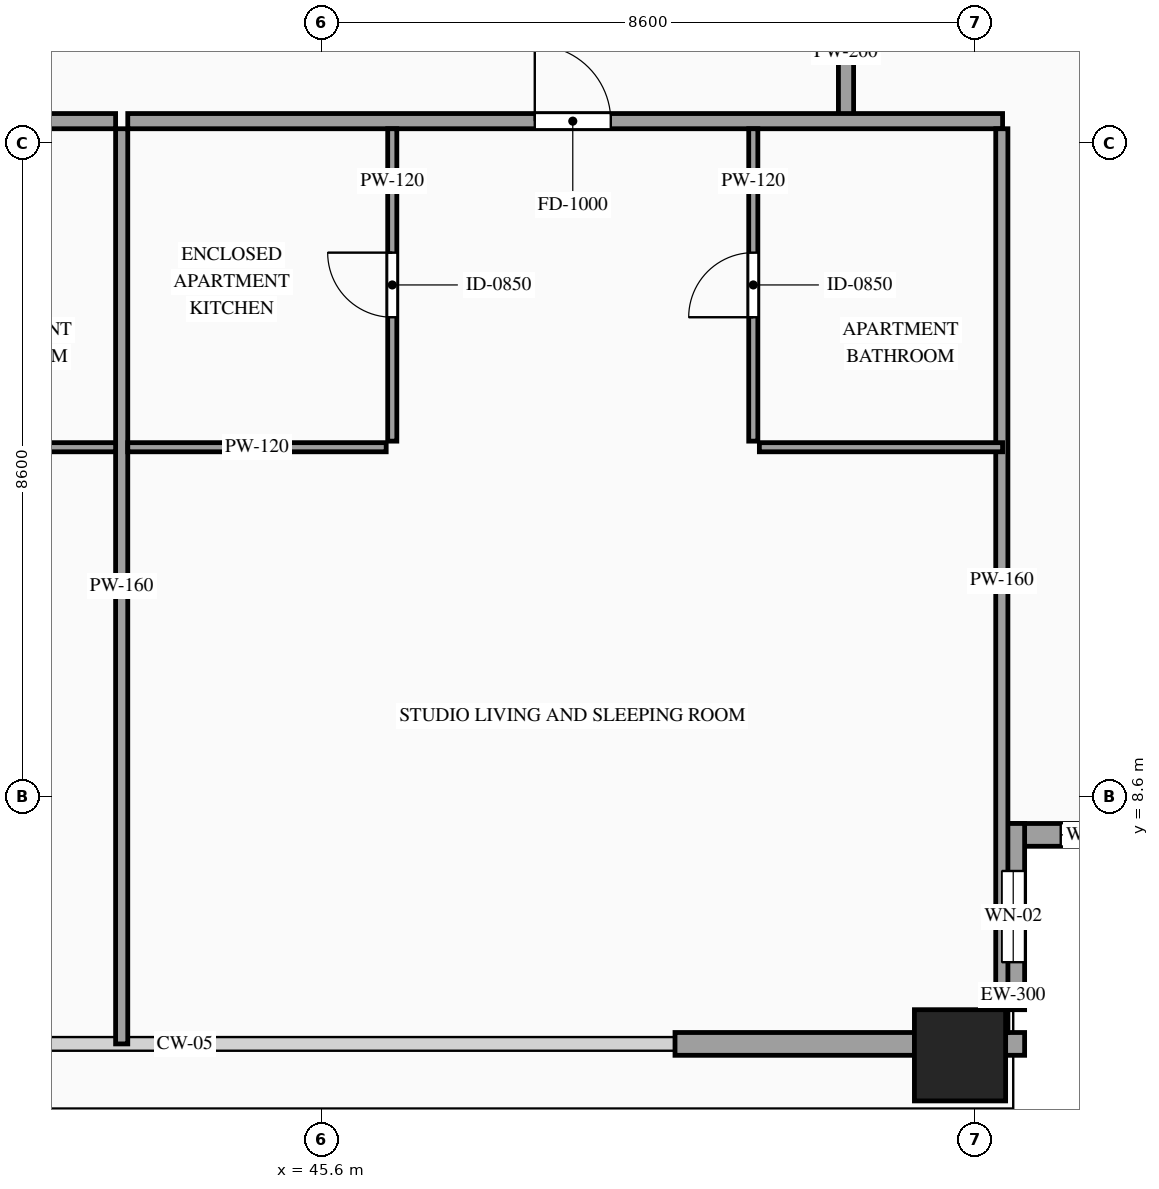
"""IFC4 building model, lengths in metres.
Left out: names, types, materials, properties, quantities, classifications, styles, units other than length and angle.
Written with IfcOpenShell. Run it as: python <this file> out.ifc"""

import sys

from ifc_helpers import new_model, si_unit, direction, frame, frame_2d, origin, origin_2d, place, context, subcontext, project, spatial, rectangle, hollow_rectangle, extrude, source, transform, mapped, element, fill, save


model = new_model("IFC4")
c1 = context("Model", 3, precision=1e-05, world=origin(), true_north=direction((0.0, 1.0)))
c2 = subcontext(c1, "Body", "Model", "MODEL_VIEW")
j1 = project(units=[si_unit("LENGTHUNIT", "METRE"), si_unit("PLANEANGLEUNIT", "RADIAN")], contexts=[c1])
p1 = place(None, origin())
s1 = spatial("IfcSite", under=j1, at=p1, CompositionType="ELEMENT")
p2 = place(p1, origin())
s2 = spatial("IfcBuilding", under=s1, at=p2, CompositionType="ELEMENT")
p3 = place(p2, frame((0.0, 0.0, 268.1)))
s3 = spatial("IfcBuildingStorey", under=s2, at=p3, CompositionType="ELEMENT", Elevation=268.1)
m1 = source(origin(), c2, "Body", "SweptSolid", [
    extrude(hollow_rectangle(XDim=1.2, YDim=1.2, WallThickness=0.055, at=origin_2d()), origin(), (0.0, 0.0, 1.0), 3.5),
])
p4 = place(p3, frame((54.0, 5.2, 0.0), z_axis=(0.0, 0.0, 1.0), x_axis=(1.0, 0.0, 0.0)))
e1 = element("IfcColumn", 1, at=p4, inside=s3, PredefinedType="COLUMN", context=c2, shape_type="MappedRepresentation", body=[
    mapped(m1, transform((0.0, 0.0, 0.0), scale=1.0)),
])
p5 = place(p3, frame((54.55, 8.1, 0.0), z_axis=(0.0, 0.0, 1.0), x_axis=(1.0, 0.0, 0.0)))
e2 = element("IfcWall", 2, at=p5, inside=s3, PredefinedType="SOLIDWALL", context=c2, shape_type="SweptSolid", body=[
    extrude(rectangle(XDim=2.45, YDim=0.3, at=frame_2d((1.225, 0.0))), origin(), (0.0, 0.0, 1.0), 3.28),
])
p6 = place(p5, frame((0.775, 0.0, 0.85)))
e3 = element("IfcOpeningElement", 3, at=p6, cuts=e2, PredefinedType="OPENING", context=c2, shape_type="SweptSolid", body=[
    extrude(rectangle(XDim=0.9, YDim=1.5, at=frame_2d((0.45, 0.75))), frame((0.0, 0.165, 0.0), z_axis=(0.0, -1.0, 0.0), x_axis=(1.0, 0.0, 0.0)), (0.0, 0.0, 1.0), 0.33),
])
p7 = place(p3, frame((54.7, 5.8, 0.0), z_axis=(0.0, 0.0, 1.0), x_axis=(0.0, 1.0, 0.0)))
e4 = element("IfcWall", 4, at=p7, inside=s3, PredefinedType="SOLIDWALL", context=c2, shape_type="SweptSolid", body=[
    extrude(rectangle(XDim=2.45, YDim=0.3, at=frame_2d((1.225, 0.0))), origin(), (0.0, 0.0, 1.0), 3.28),
])
p8 = place(p7, frame((0.625, 0.0, 0.85)))
e5 = element("IfcOpeningElement", 5, at=p8, cuts=e4, PredefinedType="OPENING", context=c2, shape_type="SweptSolid", body=[
    extrude(rectangle(XDim=1.2, YDim=2.1, at=frame_2d((0.6, 1.05))), frame((0.0, 0.165, 0.0), z_axis=(0.0, -1.0, 0.0), x_axis=(1.0, 0.0, 0.0)), (0.0, 0.0, 1.0), 0.33),
])
m2 = source(origin(), c2, "Body", "SweptSolid", [
    extrude(rectangle(XDim=0.25, YDim=0.3, at=frame_2d((0.125, 0.0))), origin(), (0.0, 0.0, 1.0), 3.28),
])
p9 = place(p3, frame((54.6, 5.35, 0.0), z_axis=(0.0, 0.0, 1.0), x_axis=(1.0, 0.0, 0.0)))
e6 = element("IfcWall", 6, at=p9, inside=s3, PredefinedType="SOLIDWALL", context=c2, shape_type="MappedRepresentation", body=[
    mapped(m2, transform((0.0, 0.0, 0.0), scale=1.0)),
])
m3 = source(origin(), c2, "Body", "SweptSolid", [
    extrude(rectangle(XDim=3.15, YDim=0.3, at=frame_2d((1.575, 0.0))), origin(), (0.0, 0.0, 1.0), 2.835),
])
p10 = place(p3, frame((50.25, 5.35, 0.0), z_axis=(0.0, 0.0, 1.0), x_axis=(1.0, 0.0, 0.0)))
e7 = element("IfcWall", 7, at=p10, inside=s3, PredefinedType="SOLIDWALL", context=c2, shape_type="MappedRepresentation", body=[
    mapped(m3, transform((0.0, 0.0, 0.0), scale=1.0)),
])
m4 = source(origin(), c2, "Body", "SweptSolid", [
    extrude(rectangle(XDim=1.7, YDim=0.2, at=frame_2d((0.85, 0.0))), origin(), (0.0, 0.0, 1.0), 3.28),
])
p11 = place(p3, frame((52.5, 17.55, 0.0), z_axis=(0.0, 0.0, 1.0), x_axis=(0.0, 1.0, 0.0)))
e8 = element("IfcWall", 8, at=p11, inside=s3, PredefinedType="PARTITIONING", context=c2, shape_type="MappedRepresentation", body=[
    mapped(m4, transform((0.0, 0.0, 0.0), scale=1.0)),
])
p12 = place(p3, frame((31.461, 17.49, 0.0), z_axis=(0.0, 0.0, 1.0), x_axis=(1.0, 0.0, 0.0)))
e9 = element("IfcWall", 9, at=p12, inside=s3, PredefinedType="PARTITIONING", context=c2, shape_type="SweptSolid", body=[
    extrude(rectangle(XDim=11.429, YDim=0.2, at=frame_2d((5.714, 0.0))), origin(), (0.0, 0.0, 1.0), 3.28),
])
p13 = place(p12, frame((5.314, 0.0, 0.0)))
e10 = element("IfcOpeningElement", 10, at=p13, cuts=e9, PredefinedType="OPENING", context=c2, shape_type="SweptSolid", body=[
    extrude(rectangle(XDim=1.0, YDim=2.2, at=frame_2d((0.5, 1.1))), frame((0.0, 0.115, 0.0), z_axis=(0.0, -1.0, 0.0), x_axis=(1.0, 0.0, 0.0)), (0.0, 0.0, 1.0), 0.23),
])
m5 = source(origin(), c2, "Body", "SweptSolid", [
    extrude(rectangle(XDim=12.04, YDim=0.16, at=frame_2d((6.02, 0.0))), origin(), (0.0, 0.0, 1.0), 3.28),
])
p14 = place(p3, frame((42.97, 5.35, 0.0), z_axis=(0.0, 0.0, 1.0), x_axis=(0.0, 1.0, 0.0)))
e11 = element("IfcWall", 11, at=p14, inside=s3, PredefinedType="PARTITIONING", context=c2, shape_type="MappedRepresentation", body=[
    mapped(m5, transform((0.0, 0.0, 0.0), scale=1.0)),
])
m6 = source(origin(), c2, "Body", "SweptSolid", [
    extrude(rectangle(XDim=3.2, YDim=0.12, at=frame_2d((1.6, 0.0))), origin(), (0.0, 0.0, 1.0), 3.28),
])
p15 = place(p3, frame((39.69, 13.2, 0.0), z_axis=(0.0, 0.0, 1.0), x_axis=(1.0, 0.0, 0.0)))
e12 = element("IfcWall", 12, at=p15, inside=s3, PredefinedType="PARTITIONING", context=c2, shape_type="MappedRepresentation", body=[
    mapped(m6, transform((0.0, 0.0, 0.0), scale=1.0)),
])
p16 = place(p3, frame((43.05, 17.49, 0.0), z_axis=(0.0, 0.0, 1.0), x_axis=(1.0, 0.0, 0.0)))
e13 = element("IfcWall", 13, at=p16, inside=s3, PredefinedType="PARTITIONING", context=c2, shape_type="SweptSolid", body=[
    extrude(rectangle(XDim=11.51, YDim=0.2, at=frame_2d((5.755, 0.0))), origin(), (0.0, 0.0, 1.0), 3.28),
])
p17 = place(p16, frame((5.355, 0.0, 0.0)))
e14 = element("IfcOpeningElement", 14, at=p17, cuts=e13, PredefinedType="OPENING", context=c2, shape_type="SweptSolid", body=[
    extrude(rectangle(XDim=1.0, YDim=2.2, at=frame_2d((0.5, 1.1))), frame((0.0, 0.115, 0.0), z_axis=(0.0, -1.0, 0.0), x_axis=(1.0, 0.0, 0.0)), (0.0, 0.0, 1.0), 0.23),
])
m7 = source(origin(), c2, "Body", "SweptSolid", [
    extrude(rectangle(XDim=11.89, YDim=0.16, at=frame_2d((5.945, 0.0))), origin(), (0.0, 0.0, 1.0), 3.28),
])
p18 = place(p3, frame((54.55, 5.5, 0.0), z_axis=(0.0, 0.0, 1.0), x_axis=(0.0, 1.0, 0.0)))
e15 = element("IfcWall", 15, at=p18, inside=s3, PredefinedType="PARTITIONING", context=c2, shape_type="MappedRepresentation", body=[
    mapped(m7, transform((0.0, 0.0, 0.0), scale=1.0)),
])
m8 = source(origin(), c2, "Body", "SweptSolid", [
    extrude(rectangle(XDim=3.4, YDim=0.12, at=frame_2d((1.7, 0.0))), origin(), (0.0, 0.0, 1.0), 3.28),
])
p19 = place(p3, frame((43.05, 13.2, 0.0), z_axis=(0.0, 0.0, 1.0), x_axis=(1.0, 0.0, 0.0)))
e16 = element("IfcWall", 16, at=p19, inside=s3, PredefinedType="PARTITIONING", context=c2, shape_type="MappedRepresentation", body=[
    mapped(m8, transform((0.0, 0.0, 0.0), scale=1.0)),
])
p20 = place(p3, frame((46.53, 13.28, 0.0), z_axis=(0.0, 0.0, 1.0), x_axis=(0.0, 1.0, 0.0)))
e17 = element("IfcWall", 17, at=p20, inside=s3, PredefinedType="PARTITIONING", context=c2, shape_type="SweptSolid", body=[
    extrude(rectangle(XDim=4.11, YDim=0.12, at=frame_2d((2.055, 0.0))), origin(), (0.0, 0.0, 1.0), 3.28),
])
p21 = place(p20, frame((1.63, 0.0, 0.0)))
e18 = element("IfcOpeningElement", 18, at=p21, cuts=e17, PredefinedType="OPENING", context=c2, shape_type="SweptSolid", body=[
    extrude(rectangle(XDim=0.85, YDim=2.1, at=frame_2d((0.425, 1.05))), frame((0.0, 0.075, 0.0), z_axis=(0.0, -1.0, 0.0), x_axis=(1.0, 0.0, 0.0)), (0.0, 0.0, 1.0), 0.15),
])
p22 = place(p3, frame((51.36, 13.2, 0.0), z_axis=(0.0, 0.0, 1.0), x_axis=(1.0, 0.0, 0.0)))
e19 = element("IfcWall", 19, at=p22, inside=s3, PredefinedType="PARTITIONING", context=c2, shape_type="MappedRepresentation", body=[
    mapped(m6, transform((0.0, 0.0, 0.0), scale=1.0)),
])
p23 = place(p3, frame((51.28, 13.28, 0.0), z_axis=(0.0, 0.0, 1.0), x_axis=(0.0, 1.0, 0.0)))
e20 = element("IfcWall", 20, at=p23, inside=s3, PredefinedType="PARTITIONING", context=c2, shape_type="SweptSolid", body=[
    extrude(rectangle(XDim=4.11, YDim=0.12, at=frame_2d((2.055, 0.0))), origin(), (0.0, 0.0, 1.0), 3.28),
])
p24 = place(p23, frame((1.63, 0.0, 0.0)))
e21 = element("IfcOpeningElement", 21, at=p24, cuts=e20, PredefinedType="OPENING", context=c2, shape_type="SweptSolid", body=[
    extrude(rectangle(XDim=0.85, YDim=2.1, at=frame_2d((0.425, 1.05))), frame((0.0, 0.075, 0.0), z_axis=(0.0, -1.0, 0.0), x_axis=(1.0, 0.0, 0.0)), (0.0, 0.0, 1.0), 0.15),
])
m9 = source(origin(), c2, "Body", "SweptSolid", [
    extrude(rectangle(XDim=0.9, YDim=1.5, at=frame_2d((0.45, 0.75))), frame((0.0, 0.03, 0.0), z_axis=(0.0, -1.0, 0.0), x_axis=(1.0, 0.0, 0.0)), (0.0, 0.0, 1.0), 0.06),
])
p25 = place(p6, origin())
e22 = element("IfcWindow", 22, at=p25, inside=s3, PartitioningType="SINGLE_PANEL", PredefinedType="WINDOW", context=c2, shape_type="MappedRepresentation", body=[
    mapped(m9, transform((0.0, 0.0, 0.0), scale=1.0)),
])
fill(e3, e22)
m10 = source(origin(), c2, "Body", "SweptSolid", [
    extrude(rectangle(XDim=1.2, YDim=2.1, at=frame_2d((0.6, 1.05))), frame((0.0, 0.03, 0.0), z_axis=(0.0, -1.0, 0.0), x_axis=(1.0, 0.0, 0.0)), (0.0, 0.0, 1.0), 0.06),
])
p26 = place(p8, origin())
e23 = element("IfcWindow", 23, at=p26, inside=s3, PartitioningType="SINGLE_PANEL", PredefinedType="WINDOW", context=c2, shape_type="MappedRepresentation", body=[
    mapped(m10, transform((0.0, 0.0, 0.0), scale=1.0)),
])
fill(e5, e23)
m11 = source(origin(), c2, "Body", "SweptSolid", [
    extrude(rectangle(XDim=1.0, YDim=2.2, at=frame_2d((0.5, 1.1))), frame((0.0, 0.025, 0.0), z_axis=(0.0, -1.0, 0.0), x_axis=(1.0, 0.0, 0.0)), (0.0, 0.0, 1.0), 0.05),
])
p27 = place(p17, origin())
e24 = element("IfcDoor", 24, at=p27, inside=s3, OperationType="SINGLE_SWING_LEFT", PredefinedType="DOOR", context=c2, shape_type="MappedRepresentation", body=[
    mapped(m11, transform((0.0, 0.0, 0.0), scale=1.0)),
])
fill(e14, e24)
m12 = source(origin(), c2, "Body", "SweptSolid", [
    extrude(rectangle(XDim=0.85, YDim=2.1, at=frame_2d((0.425, 1.05))), frame((0.0, 0.025, 0.0), z_axis=(0.0, -1.0, 0.0), x_axis=(1.0, 0.0, 0.0)), (0.0, 0.0, 1.0), 0.05),
])
p28 = place(p21, origin())
e25 = element("IfcDoor", 25, at=p28, inside=s3, OperationType="SINGLE_SWING_RIGHT", PredefinedType="DOOR", context=c2, shape_type="MappedRepresentation", body=[
    mapped(m12, transform((0.0, 0.0, 0.0), scale=1.0)),
])
fill(e18, e25)
p29 = place(p24, origin())
e26 = element("IfcDoor", 26, at=p29, inside=s3, OperationType="SINGLE_SWING_LEFT", PredefinedType="DOOR", context=c2, shape_type="MappedRepresentation", body=[
    mapped(m12, transform((0.0, 0.0, 0.0), scale=1.0)),
])
fill(e21, e26)
save(model, sys.argv[1])
